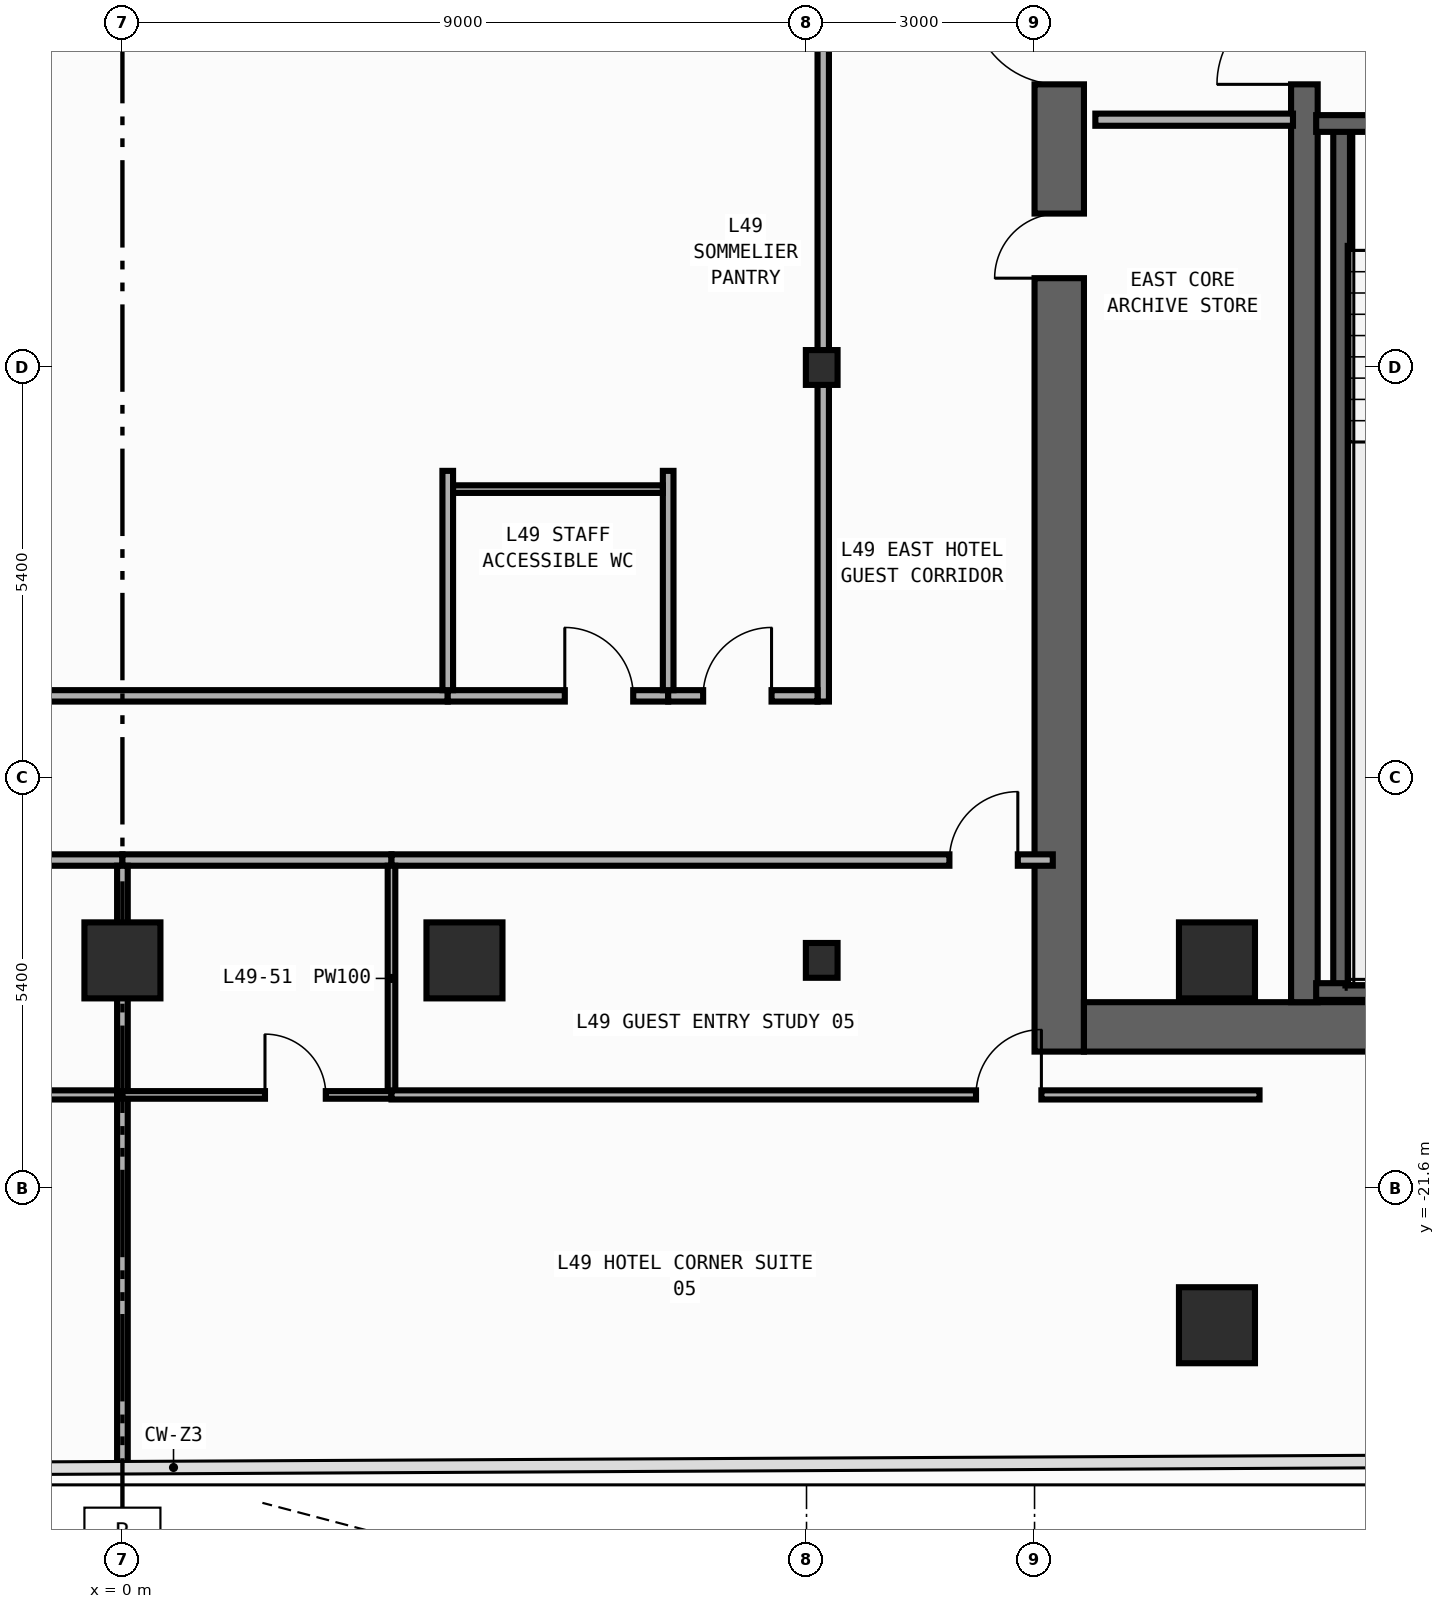
"""IFC4 building model, lengths in metres.
Left out: names, types, materials, properties, quantities, classifications, styles, units other than length and angle.
Written with IfcOpenShell. Run it as: python <this file> out.ifc"""

import sys

from ifc_helpers import new_model, si_unit, direction, frame, frame_2d, origin, origin_2d, place, context, subcontext, project, spatial, rectangle, i_section, extrude, element, fill, save


model = new_model("IFC4")
c1 = context("Model", 3, precision=1e-05, world=origin(), true_north=direction((0.0, 1.0)))
c2 = subcontext(c1, "Body", "Model", "MODEL_VIEW")
j1 = project(units=[si_unit("LENGTHUNIT", "METRE"), si_unit("PLANEANGLEUNIT", "RADIAN")], contexts=[c1])
p1 = place(None, origin())
s1 = spatial("IfcSite", under=j1, at=p1, CompositionType="ELEMENT")
p2 = place(p1, origin())
s2 = spatial("IfcBuilding", under=s1, at=p2, CompositionType="ELEMENT")
p3 = place(p2, frame((0.0, 0.0, 210.6)))
s3 = spatial("IfcBuildingStorey", under=s2, at=p3, CompositionType="ELEMENT", Elevation=210.6)
p4 = place(p3, frame((12.325, -19.8, 0.0), z_axis=(0.0, 0.0, 1.0), x_axis=(0.0, 1.0, 0.0)))
e1 = element("IfcWall", 1, at=p4, inside=s3, PredefinedType="SHEAR", context=c2, shape_type="SweptSolid", body=[
    extrude(rectangle(XDim=27.0, YDim=0.65, at=frame_2d((13.5, 0.0))), origin(), (0.0, 0.0, 1.0), 3.45),
])
p5 = place(p4, frame((23.05, 0.0, 0.0)))
e2 = element("IfcOpeningElement", 2, at=p5, cuts=e1, PredefinedType="OPENING", context=c2, shape_type="SweptSolid", body=[
    extrude(rectangle(XDim=1.1, YDim=2.2, at=frame_2d((0.55, 1.1))), frame((0.0, 0.335, 0.0), z_axis=(0.0, -1.0, 0.0), x_axis=(1.0, 0.0, 0.0)), (0.0, 0.0, 1.0), 0.67),
])
p6 = place(p4, frame((19.85, 0.0, 0.0)))
e3 = element("IfcOpeningElement", 3, at=p6, cuts=e1, PredefinedType="OPENING", context=c2, shape_type="SweptSolid", body=[
    extrude(rectangle(XDim=1.1, YDim=2.2, at=frame_2d((0.55, 1.1))), frame((0.0, 0.335, 0.0), z_axis=(0.0, -1.0, 0.0), x_axis=(1.0, 0.0, 0.0)), (0.0, 0.0, 1.0), 0.67),
])
p7 = place(p4, frame((16.65, 0.0, 0.0)))
e4 = element("IfcOpeningElement", 4, at=p7, cuts=e1, PredefinedType="OPENING", context=c2, shape_type="SweptSolid", body=[
    extrude(rectangle(XDim=1.1, YDim=2.2, at=frame_2d((0.55, 1.1))), frame((0.0, 0.335, 0.0), z_axis=(0.0, -1.0, 0.0), x_axis=(1.0, 0.0, 0.0)), (0.0, 0.0, 1.0), 0.67),
])
p8 = place(p4, frame((10.175, 0.0, 0.0)))
e5 = element("IfcOpeningElement", 5, at=p8, cuts=e1, PredefinedType="OPENING", context=c2, shape_type="SweptSolid", body=[
    extrude(rectangle(XDim=0.85, YDim=2.1, at=frame_2d((0.425, 1.05))), frame((0.0, 0.335, 0.0), z_axis=(0.0, -1.0, 0.0), x_axis=(1.0, 0.0, 0.0)), (0.0, 0.0, 1.0), 0.67),
])
p9 = place(p4, frame((12.725, 0.0, 0.0)))
e6 = element("IfcOpeningElement", 6, at=p9, cuts=e1, PredefinedType="OPENING", context=c2, shape_type="SweptSolid", body=[
    extrude(rectangle(XDim=1.15, YDim=2.2, at=frame_2d((0.575, 1.1))), frame((0.0, 0.335, 0.0), z_axis=(0.0, -1.0, 0.0), x_axis=(1.0, 0.0, 0.0)), (0.0, 0.0, 1.0), 0.67),
])
p10 = place(p4, frame((25.125, 0.0, 0.0)))
e7 = element("IfcOpeningElement", 7, at=p10, cuts=e1, PredefinedType="OPENING", context=c2, shape_type="SweptSolid", body=[
    extrude(rectangle(XDim=0.85, YDim=2.1, at=frame_2d((0.425, 1.05))), frame((0.0, 0.335, 0.0), z_axis=(0.0, -1.0, 0.0), x_axis=(1.0, 0.0, 0.0)), (0.0, 0.0, 1.0), 0.67),
])
p11 = place(p3, frame((12.65, -19.475, 0.0), z_axis=(0.0, 0.0, 1.0), x_axis=(1.0, 0.0, 0.0)))
e8 = element("IfcWall", 8, at=p11, inside=s3, PredefinedType="SHEAR", context=c2, shape_type="SweptSolid", body=[
    extrude(rectangle(XDim=7.1, YDim=0.65, at=frame_2d((3.55, 0.0))), origin(), (0.0, 0.0, 1.0), 3.45),
])
p12 = place(p3, frame((15.55, -19.15, 0.0), z_axis=(0.0, 0.0, 1.0), x_axis=(0.0, 1.0, 0.0)))
e9 = element("IfcWall", 9, at=p12, inside=s3, PredefinedType="SHEAR", context=c2, shape_type="SweptSolid", body=[
    extrude(rectangle(XDim=25.7, YDim=0.35, at=frame_2d((12.85, 0.0))), origin(), (0.0, 0.0, 1.0), 3.45),
])
p13 = place(p12, frame((12.075, 0.0, 0.0)))
e10 = element("IfcOpeningElement", 10, at=p13, cuts=e9, PredefinedType="OPENING", context=c2, shape_type="SweptSolid", body=[
    extrude(rectangle(XDim=1.15, YDim=2.2, at=frame_2d((0.575, 1.1))), frame((0.0, 0.185, 0.0), z_axis=(0.0, -1.0, 0.0), x_axis=(1.0, 0.0, 0.0)), (0.0, 0.0, 1.0), 0.37),
])
p14 = place(p12, frame((24.475, 0.0, 0.0)))
e11 = element("IfcOpeningElement", 11, at=p14, cuts=e9, PredefinedType="OPENING", context=c2, shape_type="SweptSolid", body=[
    extrude(rectangle(XDim=0.85, YDim=2.1, at=frame_2d((0.425, 1.05))), frame((0.0, 0.185, 0.0), z_axis=(0.0, -1.0, 0.0), x_axis=(1.0, 0.0, 0.0)), (0.0, 0.0, 1.0), 0.37),
])
p15 = place(p3, frame((16.04, -19.01, 0.0), z_axis=(0.0, 0.0, 1.0), x_axis=(0.0, 1.0, 0.0)))
e12 = element("IfcWall", 12, at=p15, inside=s3, PredefinedType="SHEAR", context=c2, shape_type="SweptSolid", body=[
    extrude(rectangle(XDim=11.42, YDim=0.22, at=frame_2d((5.71, 0.0))), origin(), (0.0, 0.0, 1.0), 3.45),
])
p16 = place(p3, frame((15.705, -19.01, 0.0), z_axis=(0.0, 0.0, 1.0), x_axis=(1.0, 0.0, 0.0)))
e13 = element("IfcWall", 13, at=p16, inside=s3, PredefinedType="SHEAR", context=c2, shape_type="SweptSolid", body=[
    extrude(rectangle(XDim=4.065, YDim=0.22, at=frame_2d((2.032, 0.0))), origin(), (0.0, 0.0, 1.0), 3.45),
])
p17 = place(p3, frame((19.77, -7.59, 0.0), z_axis=(0.0, 0.0, 1.0), x_axis=(-1.0, 0.0, 0.0)))
e14 = element("IfcWall", 14, at=p17, inside=s3, PredefinedType="SHEAR", context=c2, shape_type="SweptSolid", body=[
    extrude(rectangle(XDim=4.065, YDim=0.22, at=frame_2d((2.032, 0.0))), origin(), (0.0, 0.0, 1.0), 3.45),
])
p18 = place(p17, frame((1.08, 0.0, 0.0)))
e15 = element("IfcOpeningElement", 15, at=p18, cuts=e14, PredefinedType="OPENING", context=c2, shape_type="SweptSolid", body=[
    extrude(rectangle(XDim=1.1, YDim=2.2, at=frame_2d((0.55, 1.1))), frame((0.0, 0.12, 0.0), z_axis=(0.0, -1.0, 0.0), x_axis=(1.0, 0.0, 0.0)), (0.0, 0.0, 1.0), 0.24),
])
for number, where, z_axis, x_axis in (
    (16, (9.2, -18.6, 0.0), (0.0, 0.0, 1.0), (1.0, 0.0, 0.0)),
    (17, (9.2, -10.8, 0.0), (0.0, 0.0, 1.0), (1.0, 0.0, 0.0)),
):
    element("IfcColumn", number, at=place(p3, frame(where, z_axis=z_axis, x_axis=x_axis)), inside=s3, PredefinedType="COLUMN", context=c2, shape_type="SweptSolid", body=[
        extrude(i_section(OverallWidth=0.417, OverallDepth=0.458, WebThickness=0.03, FlangeThickness=0.05, FilletRadius=0.022, at=origin_2d()), origin(), (0.0, 0.0, 1.0), 3.8),
    ])
for number, where, z_axis, x_axis in (
    (18, (14.4, -18.6, 0.0), (0.0, 0.0, 1.0), (1.0, 0.0, 0.0)),
    (19, (0.0, -18.6, 0.0), (0.0, 0.0, 1.0), (1.0, 0.0, 0.0)),
    (20, (4.5, -18.6, 0.0), (0.0, 0.0, 1.0), (1.0, 0.0, 0.0)),
    (21, (14.4, -23.4, 0.0), (0.0, 0.0, 1.0), (1.0, 0.0, 0.0)),
):
    element("IfcColumn", number, at=place(p3, frame(where, z_axis=z_axis, x_axis=x_axis)), inside=s3, PredefinedType="COLUMN", context=c2, shape_type="SweptSolid", body=[
        extrude(rectangle(XDim=1.0, YDim=1.0, at=origin_2d()), origin(), (0.0, 0.0, 1.0), 3.8),
    ])
p19 = place(p3, frame((12.8, -7.54, 0.0), z_axis=(0.0, 0.0, 1.0), x_axis=(1.0, 0.0, 0.0)))
e22 = element("IfcWall", 22, at=p19, inside=s3, PredefinedType="STANDARD", context=c2, shape_type="SweptSolid", body=[
    extrude(rectangle(XDim=2.6, YDim=0.16, at=frame_2d((1.3, 0.0))), origin(), (0.0, 0.0, 1.0), 3.45),
])
p20 = place(p3, frame((9.22, -15.195, 0.0), z_axis=(0.0, 0.0, 1.0), x_axis=(0.0, 1.0, 0.0)))
e23 = element("IfcWall", 23, at=p20, inside=s3, PredefinedType="PARTITIONING", context=c2, shape_type="SweptSolid", body=[
    extrude(rectangle(XDim=19.395, YDim=0.15, at=frame_2d((9.698, 0.0))), origin(), (0.0, 0.0, 1.0), 2.862),
])
p21 = place(p20, frame((9.348, 0.0, 0.0)))
e24 = element("IfcOpeningElement", 24, at=p21, cuts=e23, PredefinedType="OPENING", context=c2, shape_type="SweptSolid", body=[
    extrude(rectangle(XDim=0.9, YDim=2.15, at=frame_2d((0.45, 1.075))), frame((0.0, 0.085, 0.0), z_axis=(0.0, -1.0, 0.0), x_axis=(1.0, 0.0, 0.0)), (0.0, 0.0, 1.0), 0.17),
])
p22 = place(p3, frame((-3.32, -15.12, 0.0), z_axis=(0.0, 0.0, 1.0), x_axis=(1.0, 0.0, 0.0)))
e25 = element("IfcWall", 25, at=p22, inside=s3, PredefinedType="PARTITIONING", context=c2, shape_type="SweptSolid", body=[
    extrude(rectangle(XDim=7.6, YDim=0.15, at=frame_2d((3.8, 0.0))), origin(), (0.0, 0.0, 1.0), 3.45),
])
p23 = place(p22, frame((0.667, 0.0, 0.0)))
e26 = element("IfcOpeningElement", 26, at=p23, cuts=e25, PredefinedType="OPENING", context=c2, shape_type="SweptSolid", body=[
    extrude(rectangle(XDim=0.9, YDim=2.15, at=frame_2d((0.45, 1.075))), frame((0.0, 0.085, 0.0), z_axis=(0.0, -1.0, 0.0), x_axis=(1.0, 0.0, 0.0)), (0.0, 0.0, 1.0), 0.17),
])
p24 = place(p3, frame((4.28, -15.12, 0.0), z_axis=(0.0, 0.0, 1.0), x_axis=(1.0, 0.0, 0.0)))
e27 = element("IfcWall", 27, at=p24, inside=s3, PredefinedType="PARTITIONING", context=c2, shape_type="SweptSolid", body=[
    extrude(rectangle(XDim=2.9, YDim=0.15, at=frame_2d((1.45, 0.0))), origin(), (0.0, 0.0, 1.0), 3.45),
])
p25 = place(p24, frame((1.54, 0.0, 0.0)))
e28 = element("IfcOpeningElement", 28, at=p25, cuts=e27, PredefinedType="OPENING", context=c2, shape_type="SweptSolid", body=[
    extrude(rectangle(XDim=0.9, YDim=2.15, at=frame_2d((0.45, 1.075))), frame((0.0, 0.085, 0.0), z_axis=(0.0, -1.0, 0.0), x_axis=(1.0, 0.0, 0.0)), (0.0, 0.0, 1.0), 0.17),
])
p26 = place(p3, frame((7.18, -15.12, 0.0), z_axis=(0.0, 0.0, 1.0), x_axis=(1.0, 0.0, 0.0)))
e29 = element("IfcWall", 29, at=p26, inside=s3, PredefinedType="PARTITIONING", context=c2, shape_type="SweptSolid", body=[
    extrude(rectangle(XDim=1.965, YDim=0.15, at=frame_2d((0.982, 0.0))), origin(), (0.0, 0.0, 1.0), 3.45),
])
p27 = place(p26, frame((0.46, 0.0, 0.0)))
e30 = element("IfcOpeningElement", 30, at=p27, cuts=e29, PredefinedType="OPENING", context=c2, shape_type="SweptSolid", body=[
    extrude(rectangle(XDim=0.9, YDim=2.15, at=frame_2d((0.45, 1.075))), frame((0.0, 0.085, 0.0), z_axis=(0.0, -1.0, 0.0), x_axis=(1.0, 0.0, 0.0)), (0.0, 0.0, 1.0), 0.17),
])
p28 = place(p3, frame((-18.26, -17.28, 0.0), z_axis=(0.0, 0.0, 1.0), x_axis=(1.0, 0.0, 0.0)))
e31 = element("IfcWall", 31, at=p28, inside=s3, PredefinedType="PARTITIONING", context=c2, shape_type="SweptSolid", body=[
    extrude(rectangle(XDim=18.26, YDim=0.15, at=frame_2d((9.13, 0.0))), origin(), (0.0, 0.0, 1.0), 3.45),
])
p29 = place(p28, frame((0.46, 0.0, 0.0)))
e32 = element("IfcOpeningElement", 32, at=p29, cuts=e31, PredefinedType="OPENING", context=c2, shape_type="SweptSolid", body=[
    extrude(rectangle(XDim=0.9, YDim=2.15, at=frame_2d((0.45, 1.075))), frame((0.0, 0.085, 0.0), z_axis=(0.0, -1.0, 0.0), x_axis=(1.0, 0.0, 0.0)), (0.0, 0.0, 1.0), 0.17),
])
p30 = place(p3, frame((0.0, -17.28, 0.0), z_axis=(0.0, 0.0, 1.0), x_axis=(1.0, 0.0, 0.0)))
e33 = element("IfcWall", 33, at=p30, inside=s3, PredefinedType="PARTITIONING", context=c2, shape_type="SweptSolid", body=[
    extrude(rectangle(XDim=3.54, YDim=0.15, at=frame_2d((1.77, 0.0))), origin(), (0.0, 0.0, 1.0), 3.45),
])
p31 = place(p3, frame((3.54, -17.28, 0.0), z_axis=(0.0, 0.0, 1.0), x_axis=(1.0, 0.0, 0.0)))
e34 = element("IfcWall", 34, at=p31, inside=s3, PredefinedType="PARTITIONING", context=c2, shape_type="SweptSolid", body=[
    extrude(rectangle(XDim=8.7, YDim=0.15, at=frame_2d((4.35, 0.0))), origin(), (0.0, 0.0, 1.0), 3.45),
])
p32 = place(p31, frame((7.34, 0.0, 0.0)))
e35 = element("IfcOpeningElement", 35, at=p32, cuts=e34, PredefinedType="OPENING", context=c2, shape_type="SweptSolid", body=[
    extrude(rectangle(XDim=0.9, YDim=2.15, at=frame_2d((0.45, 1.075))), frame((0.0, 0.085, 0.0), z_axis=(0.0, -1.0, 0.0), x_axis=(1.0, 0.0, 0.0)), (0.0, 0.0, 1.0), 0.17),
])
for number, where, z_axis, x_axis in (
    (36, (4.28, -15.045, 0.0), (0.0, 0.0, 1.0), (0.0, 1.0, 0.0)),
    (37, (7.18, -15.045, 0.0), (0.0, 0.0, 1.0), (0.0, 1.0, 0.0)),
):
    element("IfcWall", number, at=place(p3, frame(where, z_axis=z_axis, x_axis=x_axis)), inside=s3, PredefinedType="PARTITIONING", context=c2, shape_type="SweptSolid", body=[
        extrude(rectangle(XDim=2.885, YDim=0.14, at=frame_2d((1.442, 0.0))), origin(), (0.0, 0.0, 1.0), 3.45),
    ])
p33 = place(p3, frame((-18.26, -20.37, 0.0), z_axis=(0.0, 0.0, 1.0), x_axis=(1.0, 0.0, 0.0)))
e38 = element("IfcWall", 38, at=p33, inside=s3, PredefinedType="PARTITIONING", context=c2, shape_type="SweptSolid", body=[
    extrude(rectangle(XDim=18.26, YDim=0.12, at=frame_2d((9.13, 0.0))), origin(), (0.0, 0.0, 1.0), 3.45),
])
p34 = place(p33, frame((0.46, 0.0, 0.0)))
e39 = element("IfcOpeningElement", 39, at=p34, cuts=e38, PredefinedType="OPENING", context=c2, shape_type="SweptSolid", body=[
    extrude(rectangle(XDim=0.86, YDim=2.15, at=frame_2d((0.43, 1.075))), frame((0.0, 0.07, 0.0), z_axis=(0.0, -1.0, 0.0), x_axis=(1.0, 0.0, 0.0)), (0.0, 0.0, 1.0), 0.14),
])
p35 = place(p3, frame((0.0, -20.37, 0.0), z_axis=(0.0, 0.0, 1.0), x_axis=(0.0, 1.0, 0.0)))
e40 = element("IfcWall", 40, at=p35, inside=s3, PredefinedType="PARTITIONING", context=c2, shape_type="SweptSolid", body=[
    extrude(rectangle(XDim=3.015, YDim=0.14, at=frame_2d((1.508, 0.0))), origin(), (0.0, 0.0, 1.0), 3.45),
])
p36 = place(p3, frame((0.0, -25.27, 0.0), z_axis=(0.0, 0.0, 1.0), x_axis=(0.0, 1.0, 0.0)))
e41 = element("IfcWall", 41, at=p36, inside=s3, PredefinedType="PARTITIONING", context=c2, shape_type="SweptSolid", body=[
    extrude(rectangle(XDim=4.9, YDim=0.14, at=frame_2d((2.45, 0.0))), origin(), (0.0, 0.0, 1.0), 3.45),
])
p37 = place(p3, frame((3.54, -20.32, 0.0), z_axis=(0.0, 0.0, 1.0), x_axis=(0.0, 1.0, 0.0)))
e42 = element("IfcWall", 42, at=p37, inside=s3, PredefinedType="PARTITIONING", context=c2, shape_type="SweptSolid", body=[
    extrude(rectangle(XDim=2.965, YDim=0.1, at=frame_2d((1.482, 0.0))), origin(), (0.0, 0.0, 1.0), 3.45),
])
p38 = place(p3, frame((0.0, -20.37, 0.0), z_axis=(0.0, 0.0, 1.0), x_axis=(1.0, 0.0, 0.0)))
e43 = element("IfcWall", 43, at=p38, inside=s3, PredefinedType="PARTITIONING", context=c2, shape_type="SweptSolid", body=[
    extrude(rectangle(XDim=3.54, YDim=0.1, at=frame_2d((1.77, 0.0))), origin(), (0.0, 0.0, 1.0), 3.45),
])
p39 = place(p38, frame((1.875, 0.0, 0.0)))
e44 = element("IfcOpeningElement", 44, at=p39, cuts=e43, PredefinedType="OPENING", context=c2, shape_type="SweptSolid", body=[
    extrude(rectangle(XDim=0.8, YDim=2.1, at=frame_2d((0.4, 1.05))), frame((0.0, 0.06, 0.0), z_axis=(0.0, -1.0, 0.0), x_axis=(1.0, 0.0, 0.0)), (0.0, 0.0, 1.0), 0.12),
])
p40 = place(p3, frame((3.54, -20.37, 0.0), z_axis=(0.0, 0.0, 1.0), x_axis=(1.0, 0.0, 0.0)))
e45 = element("IfcWall", 45, at=p40, inside=s3, PredefinedType="PARTITIONING", context=c2, shape_type="SweptSolid", body=[
    extrude(rectangle(XDim=11.42, YDim=0.12, at=frame_2d((5.71, 0.0))), origin(), (0.0, 0.0, 1.0), 3.45),
])
p41 = place(p40, frame((7.69, 0.0, 0.0)))
e46 = element("IfcOpeningElement", 46, at=p41, cuts=e45, PredefinedType="OPENING", context=c2, shape_type="SweptSolid", body=[
    extrude(rectangle(XDim=0.86, YDim=2.15, at=frame_2d((0.43, 1.075))), frame((0.0, 0.07, 0.0), z_axis=(0.0, -1.0, 0.0), x_axis=(1.0, 0.0, 0.0)), (0.0, 0.0, 1.0), 0.14),
])
p42 = place(p3, frame((4.35, -12.4, 0.0), z_axis=(0.0, 0.0, 1.0), x_axis=(1.0, 0.0, 0.0)))
e47 = element("IfcWall", 47, at=p42, inside=s3, PredefinedType="PARTITIONING", context=c2, shape_type="SweptSolid", body=[
    extrude(rectangle(XDim=2.76, YDim=0.1, at=frame_2d((1.38, 0.0))), origin(), (0.0, 0.0, 1.0), 3.45),
])
p43 = place(p8, origin())
e48 = element("IfcDoor", 48, at=p43, inside=s3, OperationType="SINGLE_SWING_LEFT", PredefinedType="DOOR", context=c2, shape_type="SweptSolid", body=[
    extrude(rectangle(XDim=0.85, YDim=2.1, at=frame_2d((0.425, 1.05))), frame((0.0, 0.025, 0.0), z_axis=(0.0, -1.0, 0.0), x_axis=(1.0, 0.0, 0.0)), (0.0, 0.0, 1.0), 0.05),
])
fill(e5, e48)
p44 = place(p9, origin())
e49 = element("IfcDoor", 49, at=p44, inside=s3, OperationType="SINGLE_SWING_RIGHT", PredefinedType="DOOR", context=c2, shape_type="SweptSolid", body=[
    extrude(rectangle(XDim=1.15, YDim=2.2, at=frame_2d((0.575, 1.1))), frame((0.0, 0.025, 0.0), z_axis=(0.0, -1.0, 0.0), x_axis=(1.0, 0.0, 0.0)), (0.0, 0.0, 1.0), 0.05),
])
fill(e6, e49)
p45 = place(p13, origin())
e50 = element("IfcDoor", 50, at=p45, inside=s3, OperationType="SINGLE_SWING_LEFT", PredefinedType="DOOR", context=c2, shape_type="SweptSolid", body=[
    extrude(rectangle(XDim=1.15, YDim=2.2, at=frame_2d((0.575, 1.1))), frame((0.0, 0.025, 0.0), z_axis=(0.0, -1.0, 0.0), x_axis=(1.0, 0.0, 0.0)), (0.0, 0.0, 1.0), 0.05),
])
fill(e10, e50)
p46 = place(p25, origin())
e51 = element("IfcDoor", 51, at=p46, inside=s3, OperationType="SINGLE_SWING_LEFT", PredefinedType="DOOR", context=c2, shape_type="SweptSolid", body=[
    extrude(rectangle(XDim=0.9, YDim=2.15, at=frame_2d((0.45, 1.075))), frame((0.0, 0.025, 0.0), z_axis=(0.0, -1.0, 0.0), x_axis=(1.0, 0.0, 0.0)), (0.0, 0.0, 1.0), 0.05),
])
fill(e28, e51)
p47 = place(p27, origin())
e52 = element("IfcDoor", 52, at=p47, inside=s3, OperationType="SINGLE_SWING_RIGHT", PredefinedType="DOOR", context=c2, shape_type="SweptSolid", body=[
    extrude(rectangle(XDim=0.9, YDim=2.15, at=frame_2d((0.45, 1.075))), frame((0.0, 0.025, 0.0), z_axis=(0.0, -1.0, 0.0), x_axis=(1.0, 0.0, 0.0)), (0.0, 0.0, 1.0), 0.05),
])
fill(e30, e52)
p48 = place(p32, origin())
e53 = element("IfcDoor", 53, at=p48, inside=s3, OperationType="SINGLE_SWING_RIGHT", PredefinedType="DOOR", context=c2, shape_type="SweptSolid", body=[
    extrude(rectangle(XDim=0.9, YDim=2.15, at=frame_2d((0.45, 1.075))), frame((0.0, 0.025, 0.0), z_axis=(0.0, -1.0, 0.0), x_axis=(1.0, 0.0, 0.0)), (0.0, 0.0, 1.0), 0.05),
])
fill(e35, e53)
p49 = place(p39, origin())
e54 = element("IfcDoor", 54, at=p49, inside=s3, OperationType="SINGLE_SWING_LEFT", PredefinedType="DOOR", context=c2, shape_type="SweptSolid", body=[
    extrude(rectangle(XDim=0.8, YDim=2.1, at=frame_2d((0.4, 1.05))), frame((0.0, 0.025, 0.0), z_axis=(0.0, -1.0, 0.0), x_axis=(1.0, 0.0, 0.0)), (0.0, 0.0, 1.0), 0.05),
])
fill(e44, e54)
p50 = place(p41, origin())
e55 = element("IfcDoor", 55, at=p50, inside=s3, OperationType="SINGLE_SWING_RIGHT", PredefinedType="DOOR", context=c2, shape_type="SweptSolid", body=[
    extrude(rectangle(XDim=0.86, YDim=2.15, at=frame_2d((0.43, 1.075))), frame((0.0, 0.025, 0.0), z_axis=(0.0, -1.0, 0.0), x_axis=(1.0, 0.0, 0.0)), (0.0, 0.0, 1.0), 0.05),
])
fill(e46, e55)
save(model, sys.argv[1])
